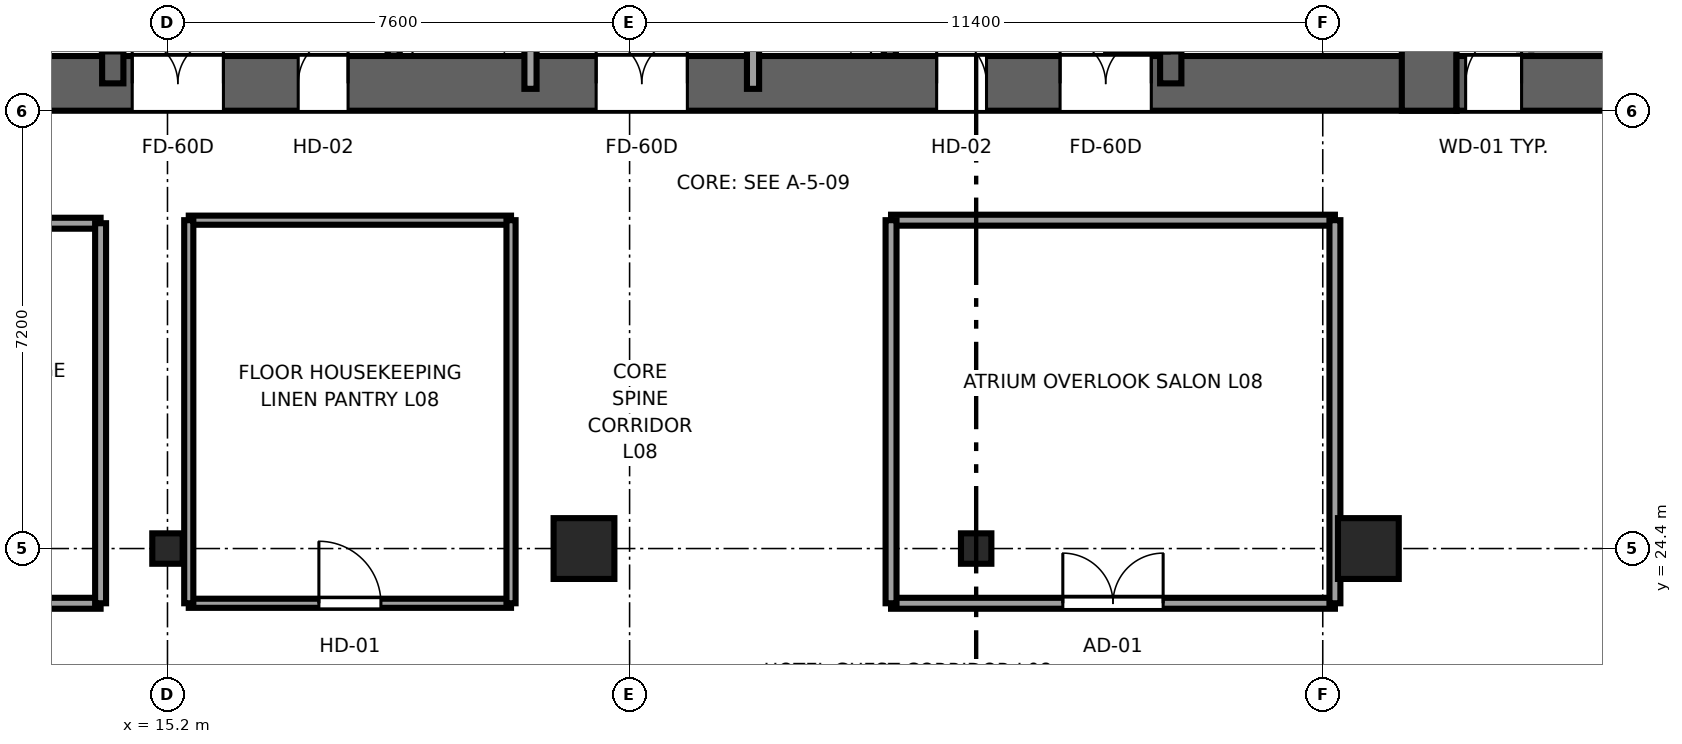
"""IFC4 building model, lengths in metres.
Left out: names, types, materials, properties, quantities, classifications, styles, units other than length and angle.
Written with IfcOpenShell. Run it as: python <this file> out.ifc"""

import sys

from ifc_helpers import new_model, si_unit, direction, frame, frame_2d, origin, origin_2d, place, context, subcontext, project, spatial, rectangle, i_section, extrude, source, transform, mapped, element, fill, save


model = new_model("IFC4")
c1 = context("Model", 3, precision=1e-05, world=origin(), true_north=direction((0.0, 1.0)))
c2 = subcontext(c1, "Body", "Model", "MODEL_VIEW")
j1 = project(units=[si_unit("LENGTHUNIT", "METRE"), si_unit("PLANEANGLEUNIT", "RADIAN")], contexts=[c1])
p1 = place(None, origin())
s1 = spatial("IfcSite", under=j1, at=p1, CompositionType="ELEMENT")
p2 = place(p1, origin())
s2 = spatial("IfcBuilding", under=s1, at=p2, CompositionType="ELEMENT")
p3 = place(p2, frame((0.0, 0.0, 39.1)))
s3 = spatial("IfcBuildingStorey", under=s2, at=p3, CompositionType="ELEMENT", Elevation=39.1)
p4 = place(p3, frame((9.6, 32.05, 0.0), z_axis=(0.0, 0.0, 1.0), x_axis=(1.0, 0.0, 0.0)))
e1 = element("IfcWall", 1, at=p4, inside=s3, PredefinedType="SHEAR", context=c2, shape_type="SweptSolid", body=[
    extrude(rectangle(XDim=26.8, YDim=0.9, at=frame_2d((13.4, 0.0))), origin(), (0.0, 0.0, 1.0), 3.55),
])
p5 = place(p4, frame((6.52, 0.0, 0.0), z_axis=(0.0, 0.0, 1.0), x_axis=(-1.0, 0.0, 0.0)))
e2 = element("IfcOpeningElement", 2, at=p5, cuts=e1, PredefinedType="OPENING", context=c2, shape_type="SweptSolid", body=[
    extrude(rectangle(XDim=1.5, YDim=2.04, at=frame_2d((0.75, 1.02))), frame((0.0, 0.46, 0.0), z_axis=(0.0, -1.0, 0.0), x_axis=(1.0, 0.0, 0.0)), (0.0, 0.0, 1.0), 0.92),
])
p6 = place(p4, frame((14.15, 0.0, 0.0), z_axis=(0.0, 0.0, 1.0), x_axis=(-1.0, 0.0, 0.0)))
e3 = element("IfcOpeningElement", 3, at=p6, cuts=e1, PredefinedType="OPENING", context=c2, shape_type="SweptSolid", body=[
    extrude(rectangle(XDim=1.5, YDim=2.04, at=frame_2d((0.75, 1.02))), frame((0.0, 0.46, 0.0), z_axis=(0.0, -1.0, 0.0), x_axis=(1.0, 0.0, 0.0)), (0.0, 0.0, 1.0), 0.92),
])
p7 = place(p4, frame((21.78, 0.0, 0.0), z_axis=(0.0, 0.0, 1.0), x_axis=(-1.0, 0.0, 0.0)))
e4 = element("IfcOpeningElement", 4, at=p7, cuts=e1, PredefinedType="OPENING", context=c2, shape_type="SweptSolid", body=[
    extrude(rectangle(XDim=1.5, YDim=2.04, at=frame_2d((0.75, 1.02))), frame((0.0, 0.46, 0.0), z_axis=(0.0, -1.0, 0.0), x_axis=(1.0, 0.0, 0.0)), (0.0, 0.0, 1.0), 0.92),
])
p8 = place(p4, frame((8.57, 0.0, 0.0), z_axis=(0.0, 0.0, 1.0), x_axis=(-1.0, 0.0, 0.0)))
e5 = element("IfcOpeningElement", 5, at=p8, cuts=e1, PredefinedType="OPENING", context=c2, shape_type="SweptSolid", body=[
    extrude(rectangle(XDim=0.82, YDim=2.01, at=frame_2d((0.41, 1.005))), frame((0.0, 0.46, 0.0), z_axis=(0.0, -1.0, 0.0), x_axis=(1.0, 0.0, 0.0)), (0.0, 0.0, 1.0), 0.92),
])
p9 = place(p4, frame((19.07, 0.0, 0.0), z_axis=(0.0, 0.0, 1.0), x_axis=(-1.0, 0.0, 0.0)))
e6 = element("IfcOpeningElement", 6, at=p9, cuts=e1, PredefinedType="OPENING", context=c2, shape_type="SweptSolid", body=[
    extrude(rectangle(XDim=0.82, YDim=2.01, at=frame_2d((0.41, 1.005))), frame((0.0, 0.46, 0.0), z_axis=(0.0, -1.0, 0.0), x_axis=(1.0, 0.0, 0.0)), (0.0, 0.0, 1.0), 0.92),
])
p10 = place(p3, frame((35.95, 31.6, 0.0), z_axis=(0.0, 0.0, 1.0), x_axis=(0.0, 1.0, 0.0)))
e7 = element("IfcWall", 7, at=p10, inside=s3, PredefinedType="SHEAR", context=c2, shape_type="SweptSolid", body=[
    extrude(rectangle(XDim=13.6, YDim=0.9, at=frame_2d((6.8, 0.0))), origin(), (0.0, 0.0, 1.0), 3.55),
])
p11 = place(p3, frame((14.3, 32.05, 0.0), z_axis=(0.0, 0.0, 1.0), x_axis=(0.0, 1.0, 0.0)))
e8 = element("IfcWall", 8, at=p11, inside=s3, PredefinedType="SHEAR", context=c2, shape_type="SweptSolid", body=[
    extrude(rectangle(XDim=12.7, YDim=0.35, at=frame_2d((6.35, 0.0))), origin(), (0.0, 0.0, 1.0), 3.55),
])
p12 = place(p11, frame((0.5, 0.0, 0.0)))
e9 = element("IfcOpeningElement", 9, at=p12, cuts=e8, PredefinedType="OPENING", context=c2, shape_type="SweptSolid", body=[
    extrude(rectangle(XDim=1.1, YDim=2.12, at=frame_2d((0.55, 1.06))), frame((0.0, 0.185, 0.0), z_axis=(0.0, -1.0, 0.0), x_axis=(1.0, 0.0, 0.0)), (0.0, 0.0, 1.0), 0.37),
])
p13 = place(p3, frame((31.7, 32.05, 0.0), z_axis=(0.0, 0.0, 1.0), x_axis=(0.0, 1.0, 0.0)))
e10 = element("IfcWall", 10, at=p13, inside=s3, PredefinedType="SHEAR", context=c2, shape_type="SweptSolid", body=[
    extrude(rectangle(XDim=12.7, YDim=0.35, at=frame_2d((6.35, 0.0))), origin(), (0.0, 0.0, 1.0), 3.55),
])
p14 = place(p13, frame((1.6, 0.0, 0.0), z_axis=(0.0, 0.0, 1.0), x_axis=(-1.0, 0.0, 0.0)))
e11 = element("IfcOpeningElement", 11, at=p14, cuts=e10, PredefinedType="OPENING", context=c2, shape_type="SweptSolid", body=[
    extrude(rectangle(XDim=1.1, YDim=2.12, at=frame_2d((0.55, 1.06))), frame((0.0, 0.185, 0.0), z_axis=(0.0, -1.0, 0.0), x_axis=(1.0, 0.0, 0.0)), (0.0, 0.0, 1.0), 0.37),
])
p15 = place(p3, frame((36.4, 32.05, 0.0), z_axis=(0.0, 0.0, 1.0), x_axis=(1.0, 0.0, 0.0)))
e12 = element("IfcWall", 12, at=p15, inside=s3, PredefinedType="SHEAR", context=c2, shape_type="SweptSolid", body=[
    extrude(rectangle(XDim=4.0, YDim=0.9, at=frame_2d((2.0, 0.0))), origin(), (0.0, 0.0, 1.0), 3.55),
])
p16 = place(p15, frame((1.07, 0.0, 0.0), z_axis=(0.0, 0.0, 1.0), x_axis=(-1.0, 0.0, 0.0)))
e13 = element("IfcOpeningElement", 13, at=p16, cuts=e12, PredefinedType="OPENING", context=c2, shape_type="SweptSolid", body=[
    extrude(rectangle(XDim=0.92, YDim=2.01, at=frame_2d((0.46, 1.005))), frame((0.0, 0.46, 0.0), z_axis=(0.0, -1.0, 0.0), x_axis=(1.0, 0.0, 0.0)), (0.0, 0.0, 1.0), 0.92),
])
m1 = source(origin(), c2, "Body", "SweptSolid", [
    extrude(i_section(OverallWidth=0.5, OverallDepth=0.5, WebThickness=0.028, FlangeThickness=0.045, at=origin_2d()), origin(), (0.0, 0.0, 1.0), 3.55),
])
p17 = place(p3, frame((15.2, 24.4, 0.0), z_axis=(0.0, 0.0, 1.0), x_axis=(1.0, 0.0, 0.0)))
e14 = element("IfcColumn", 14, at=p17, inside=s3, PredefinedType="COLUMN", context=c2, shape_type="MappedRepresentation", body=[
    mapped(m1, transform((0.0, 0.0, 0.0), x_axis=(1.0, 0.0, 0.0), y_axis=(0.0, 1.0, 0.0), z_axis=(0.0, 0.0, 1.0), scale=1.0)),
])
m2 = source(origin(), c2, "Body", "SweptSolid", [
    extrude(rectangle(XDim=1.0, YDim=1.0, at=origin_2d()), origin(), (0.0, 0.0, 1.0), 3.55),
])
for number, where, z_axis, x_axis in (
    (15, (22.05, 24.4, 0.0), (0.0, 0.0, 1.0), (1.0, 0.0, 0.0)),
    (16, (34.95, 24.4, 0.0), (0.0, 0.0, 1.0), (1.0, 0.0, 0.0)),
):
    element("IfcColumn", number, at=place(p3, frame(where, z_axis=z_axis, x_axis=x_axis)), inside=s3, PredefinedType="COLUMN", context=c2, shape_type="MappedRepresentation", body=[
        mapped(m2, transform((0.0, 0.0, 0.0), x_axis=(1.0, 0.0, 0.0), y_axis=(0.0, 1.0, 0.0), z_axis=(0.0, 0.0, 1.0), scale=1.0)),
    ])
p18 = place(p3, frame((28.5, 24.4, 0.0), z_axis=(0.0, 0.0, 1.0), x_axis=(1.0, 0.0, 0.0)))
e17 = element("IfcColumn", 17, at=p18, inside=s3, PredefinedType="COLUMN", context=c2, shape_type="MappedRepresentation", body=[
    mapped(m1, transform((0.0, 0.0, 0.0), x_axis=(1.0, 0.0, 0.0), y_axis=(0.0, 1.0, 0.0), z_axis=(0.0, 0.0, 1.0), scale=1.0)),
])
for number, where, z_axis, x_axis in (
    (18, (18.92, 32.504, 0.0), (0.0, 0.0, 1.0), (0.0, 1.0, 0.0)),
    (19, (27.08, 32.504, 0.0), (0.0, 0.0, 1.0), (0.0, 1.0, 0.0)),
):
    element("IfcWall", number, at=place(p3, frame(where, z_axis=z_axis, x_axis=x_axis)), inside=s3, PredefinedType="SOLIDWALL", context=c2, shape_type="SweptSolid", body=[
        extrude(rectangle(XDim=3.646, YDim=0.2, at=frame_2d((1.823, 0.0))), origin(), (0.0, 0.0, 1.0), 3.37),
    ])
for number, where, z_axis, x_axis in (
    (20, (21.17, 31.96, 0.0), (0.0, 0.0, 1.0), (0.0, 1.0, 0.0)),
    (21, (24.83, 31.96, 0.0), (0.0, 0.0, 1.0), (0.0, 1.0, 0.0)),
):
    element("IfcWall", number, at=place(p3, frame(where, z_axis=z_axis, x_axis=x_axis)), inside=s3, PredefinedType="SOLIDWALL", context=c2, shape_type="SweptSolid", body=[
        extrude(rectangle(XDim=12.58, YDim=0.2, at=frame_2d((6.29, 0.0))), origin(), (0.0, 0.0, 1.0), 3.37),
    ])
p19 = place(p3, frame((9.88, 23.5, 0.0), z_axis=(0.0, 0.0, 1.0), x_axis=(1.0, 0.0, 0.0)))
e22 = element("IfcWall", 22, at=p19, inside=s3, PredefinedType="PARTITIONING", context=c2, shape_type="SweptSolid", body=[
    extrude(rectangle(XDim=4.22, YDim=0.18, at=frame_2d((2.11, 0.0))), origin(), (0.0, 0.0, 1.0), 3.37),
])
p20 = place(p19, frame((1.285, 0.0, 0.0)))
e23 = element("IfcOpeningElement", 23, at=p20, cuts=e22, PredefinedType="OPENING", context=c2, shape_type="SweptSolid", body=[
    extrude(rectangle(XDim=1.65, YDim=2.15, at=frame_2d((0.825, 1.075))), frame((0.0, 0.1, 0.0), z_axis=(0.0, -1.0, 0.0), x_axis=(1.0, 0.0, 0.0)), (0.0, 0.0, 1.0), 0.2),
])
p21 = place(p3, frame((9.88, 29.75, 0.0), z_axis=(0.0, 0.0, 1.0), x_axis=(1.0, 0.0, 0.0)))
e24 = element("IfcWall", 24, at=p21, inside=s3, PredefinedType="PARTITIONING", context=c2, shape_type="SweptSolid", body=[
    extrude(rectangle(XDim=4.22, YDim=0.18, at=frame_2d((2.11, 0.0))), origin(), (0.0, 0.0, 1.0), 3.37),
])
p22 = place(p3, frame((14.1, 23.5, 0.0), z_axis=(0.0, 0.0, 1.0), x_axis=(0.0, 1.0, 0.0)))
e25 = element("IfcWall", 25, at=p22, inside=s3, PredefinedType="PARTITIONING", context=c2, shape_type="SweptSolid", body=[
    extrude(rectangle(XDim=6.25, YDim=0.18, at=frame_2d((3.125, 0.0))), origin(), (0.0, 0.0, 1.0), 3.37),
])
p23 = place(p3, frame((27.1, 23.5, 0.0), z_axis=(0.0, 0.0, 1.0), x_axis=(1.0, 0.0, 0.0)))
e26 = element("IfcWall", 26, at=p23, inside=s3, PredefinedType="PARTITIONING", context=c2, shape_type="SweptSolid", body=[
    extrude(rectangle(XDim=7.3, YDim=0.18, at=frame_2d((3.65, 0.0))), origin(), (0.0, 0.0, 1.0), 3.37),
])
p24 = place(p23, frame((2.825, 0.0, 0.0)))
e27 = element("IfcOpeningElement", 27, at=p24, cuts=e26, PredefinedType="OPENING", context=c2, shape_type="SweptSolid", body=[
    extrude(rectangle(XDim=1.65, YDim=2.15, at=frame_2d((0.825, 1.075))), frame((0.0, 0.1, 0.0), z_axis=(0.0, -1.0, 0.0), x_axis=(1.0, 0.0, 0.0)), (0.0, 0.0, 1.0), 0.2),
])
p25 = place(p3, frame((27.1, 29.8, 0.0), z_axis=(0.0, 0.0, 1.0), x_axis=(1.0, 0.0, 0.0)))
e28 = element("IfcWall", 28, at=p25, inside=s3, PredefinedType="PARTITIONING", context=c2, shape_type="SweptSolid", body=[
    extrude(rectangle(XDim=7.3, YDim=0.18, at=frame_2d((3.65, 0.0))), origin(), (0.0, 0.0, 1.0), 3.37),
])
for number, where, z_axis, x_axis in (
    (29, (27.1, 23.5, 0.0), (0.0, 0.0, 1.0), (0.0, 1.0, 0.0)),
    (30, (34.4, 23.5, 0.0), (0.0, 0.0, 1.0), (0.0, 1.0, 0.0)),
):
    element("IfcWall", number, at=place(p3, frame(where, z_axis=z_axis, x_axis=x_axis)), inside=s3, PredefinedType="PARTITIONING", context=c2, shape_type="SweptSolid", body=[
        extrude(rectangle(XDim=6.3, YDim=0.18, at=frame_2d((3.15, 0.0))), origin(), (0.0, 0.0, 1.0), 3.37),
    ])
p26 = place(p3, frame((15.55, 23.5, 0.0), z_axis=(0.0, 0.0, 1.0), x_axis=(1.0, 0.0, 0.0)))
e31 = element("IfcWall", 31, at=p26, inside=s3, PredefinedType="PARTITIONING", context=c2, shape_type="SweptSolid", body=[
    extrude(rectangle(XDim=5.3, YDim=0.15, at=frame_2d((2.65, 0.0))), origin(), (0.0, 0.0, 1.0), 3.37),
])
p27 = place(p26, frame((2.14, 0.0, 0.0)))
e32 = element("IfcOpeningElement", 32, at=p27, cuts=e31, PredefinedType="OPENING", context=c2, shape_type="SweptSolid", body=[
    extrude(rectangle(XDim=1.02, YDim=2.03, at=frame_2d((0.51, 1.015))), frame((0.0, 0.085, 0.0), z_axis=(0.0, -1.0, 0.0), x_axis=(1.0, 0.0, 0.0)), (0.0, 0.0, 1.0), 0.17),
])
p28 = place(p3, frame((15.55, 29.8, 0.0), z_axis=(0.0, 0.0, 1.0), x_axis=(1.0, 0.0, 0.0)))
e33 = element("IfcWall", 33, at=p28, inside=s3, PredefinedType="PARTITIONING", context=c2, shape_type="SweptSolid", body=[
    extrude(rectangle(XDim=5.3, YDim=0.15, at=frame_2d((2.65, 0.0))), origin(), (0.0, 0.0, 1.0), 3.37),
])
for number, where, z_axis, x_axis in (
    (34, (15.55, 23.5, 0.0), (0.0, 0.0, 1.0), (0.0, 1.0, 0.0)),
    (35, (20.85, 23.5, 0.0), (0.0, 0.0, 1.0), (0.0, 1.0, 0.0)),
):
    element("IfcWall", number, at=place(p3, frame(where, z_axis=z_axis, x_axis=x_axis)), inside=s3, PredefinedType="PARTITIONING", context=c2, shape_type="SweptSolid", body=[
        extrude(rectangle(XDim=6.3, YDim=0.15, at=frame_2d((3.15, 0.0))), origin(), (0.0, 0.0, 1.0), 3.37),
    ])
m3 = source(origin(), c2, "Body", "SweptSolid", [
    extrude(rectangle(XDim=1.1, YDim=2.12, at=frame_2d((0.55, 1.06))), frame((0.0, 0.025, 0.0), z_axis=(0.0, -1.0, 0.0), x_axis=(1.0, 0.0, 0.0)), (0.0, 0.0, 1.0), 0.05),
])
p29 = place(p12, origin())
e36 = element("IfcDoor", 36, at=p29, inside=s3, OperationType="SINGLE_SWING_RIGHT", PredefinedType="DOOR", context=c2, shape_type="MappedRepresentation", body=[
    mapped(m3, transform((0.0, 0.0, 0.0), x_axis=(1.0, 0.0, 0.0), y_axis=(0.0, 1.0, 0.0), z_axis=(0.0, 0.0, 1.0), scale=1.0)),
])
fill(e9, e36)
p30 = place(p14, origin())
e37 = element("IfcDoor", 37, at=p30, inside=s3, OperationType="SINGLE_SWING_LEFT", PredefinedType="DOOR", context=c2, shape_type="MappedRepresentation", body=[
    mapped(m3, transform((0.0, 0.0, 0.0), x_axis=(1.0, 0.0, 0.0), y_axis=(0.0, 1.0, 0.0), z_axis=(0.0, 0.0, 1.0), scale=1.0)),
])
fill(e11, e37)
m4 = source(origin(), c2, "Body", "SweptSolid", [
    extrude(rectangle(XDim=1.5, YDim=2.04, at=frame_2d((0.75, 1.02))), frame((0.0, 0.025, 0.0), z_axis=(0.0, -1.0, 0.0), x_axis=(1.0, 0.0, 0.0)), (0.0, 0.0, 1.0), 0.05),
])
p31 = place(p5, origin())
e38 = element("IfcDoor", 38, at=p31, inside=s3, OperationType="DOUBLE_DOOR_SINGLE_SWING", PredefinedType="DOOR", context=c2, shape_type="MappedRepresentation", body=[
    mapped(m4, transform((0.0, 0.0, 0.0), x_axis=(1.0, 0.0, 0.0), y_axis=(0.0, 1.0, 0.0), z_axis=(0.0, 0.0, 1.0), scale=1.0)),
])
fill(e2, e38)
p32 = place(p6, origin())
e39 = element("IfcDoor", 39, at=p32, inside=s3, OperationType="DOUBLE_DOOR_SINGLE_SWING", PredefinedType="DOOR", context=c2, shape_type="MappedRepresentation", body=[
    mapped(m4, transform((0.0, 0.0, 0.0), x_axis=(1.0, 0.0, 0.0), y_axis=(0.0, 1.0, 0.0), z_axis=(0.0, 0.0, 1.0), scale=1.0)),
])
fill(e3, e39)
p33 = place(p7, origin())
e40 = element("IfcDoor", 40, at=p33, inside=s3, OperationType="DOUBLE_DOOR_SINGLE_SWING", PredefinedType="DOOR", context=c2, shape_type="MappedRepresentation", body=[
    mapped(m4, transform((0.0, 0.0, 0.0), x_axis=(1.0, 0.0, 0.0), y_axis=(0.0, 1.0, 0.0), z_axis=(0.0, 0.0, 1.0), scale=1.0)),
])
fill(e4, e40)
m5 = source(origin(), c2, "Body", "SweptSolid", [
    extrude(rectangle(XDim=0.82, YDim=2.01, at=frame_2d((0.41, 1.005))), frame((0.0, 0.025, 0.0), z_axis=(0.0, -1.0, 0.0), x_axis=(1.0, 0.0, 0.0)), (0.0, 0.0, 1.0), 0.05),
])
p34 = place(p8, origin())
e41 = element("IfcDoor", 41, at=p34, inside=s3, OperationType="SINGLE_SWING_RIGHT", PredefinedType="DOOR", context=c2, shape_type="MappedRepresentation", body=[
    mapped(m5, transform((0.0, 0.0, 0.0), x_axis=(1.0, 0.0, 0.0), y_axis=(0.0, 1.0, 0.0), z_axis=(0.0, 0.0, 1.0), scale=1.0)),
])
fill(e5, e41)
p35 = place(p9, origin())
e42 = element("IfcDoor", 42, at=p35, inside=s3, OperationType="SINGLE_SWING_LEFT", PredefinedType="DOOR", context=c2, shape_type="MappedRepresentation", body=[
    mapped(m5, transform((0.0, 0.0, 0.0), x_axis=(1.0, 0.0, 0.0), y_axis=(0.0, 1.0, 0.0), z_axis=(0.0, 0.0, 1.0), scale=1.0)),
])
fill(e6, e42)
m6 = source(origin(), c2, "Body", "SweptSolid", [
    extrude(rectangle(XDim=0.92, YDim=2.01, at=frame_2d((0.46, 1.005))), frame((0.0, 0.025, 0.0), z_axis=(0.0, -1.0, 0.0), x_axis=(1.0, 0.0, 0.0)), (0.0, 0.0, 1.0), 0.05),
])
p36 = place(p16, origin())
e43 = element("IfcDoor", 43, at=p36, inside=s3, OperationType="SINGLE_SWING_RIGHT", PredefinedType="DOOR", context=c2, shape_type="MappedRepresentation", body=[
    mapped(m6, transform((0.0, 0.0, 0.0), x_axis=(1.0, 0.0, 0.0), y_axis=(0.0, 1.0, 0.0), z_axis=(0.0, 0.0, 1.0), scale=1.0)),
])
fill(e13, e43)
m7 = source(origin(), c2, "Body", "SweptSolid", [
    extrude(rectangle(XDim=1.65, YDim=2.15, at=frame_2d((0.825, 1.075))), frame((0.0, 0.025, 0.0), z_axis=(0.0, -1.0, 0.0), x_axis=(1.0, 0.0, 0.0)), (0.0, 0.0, 1.0), 0.05),
])
p37 = place(p24, origin())
e44 = element("IfcDoor", 44, at=p37, inside=s3, OperationType="DOUBLE_DOOR_SINGLE_SWING", PredefinedType="DOOR", context=c2, shape_type="MappedRepresentation", body=[
    mapped(m7, transform((0.0, 0.0, 0.0), x_axis=(1.0, 0.0, 0.0), y_axis=(0.0, 1.0, 0.0), z_axis=(0.0, 0.0, 1.0), scale=1.0)),
])
fill(e27, e44)
m8 = source(origin(), c2, "Body", "SweptSolid", [
    extrude(rectangle(XDim=1.02, YDim=2.03, at=frame_2d((0.51, 1.015))), frame((0.0, 0.025, 0.0), z_axis=(0.0, -1.0, 0.0), x_axis=(1.0, 0.0, 0.0)), (0.0, 0.0, 1.0), 0.05),
])
p38 = place(p27, origin())
e45 = element("IfcDoor", 45, at=p38, inside=s3, OperationType="SINGLE_SWING_LEFT", PredefinedType="DOOR", context=c2, shape_type="MappedRepresentation", body=[
    mapped(m8, transform((0.0, 0.0, 0.0), x_axis=(1.0, 0.0, 0.0), y_axis=(0.0, 1.0, 0.0), z_axis=(0.0, 0.0, 1.0), scale=1.0)),
])
fill(e32, e45)
save(model, sys.argv[1])
